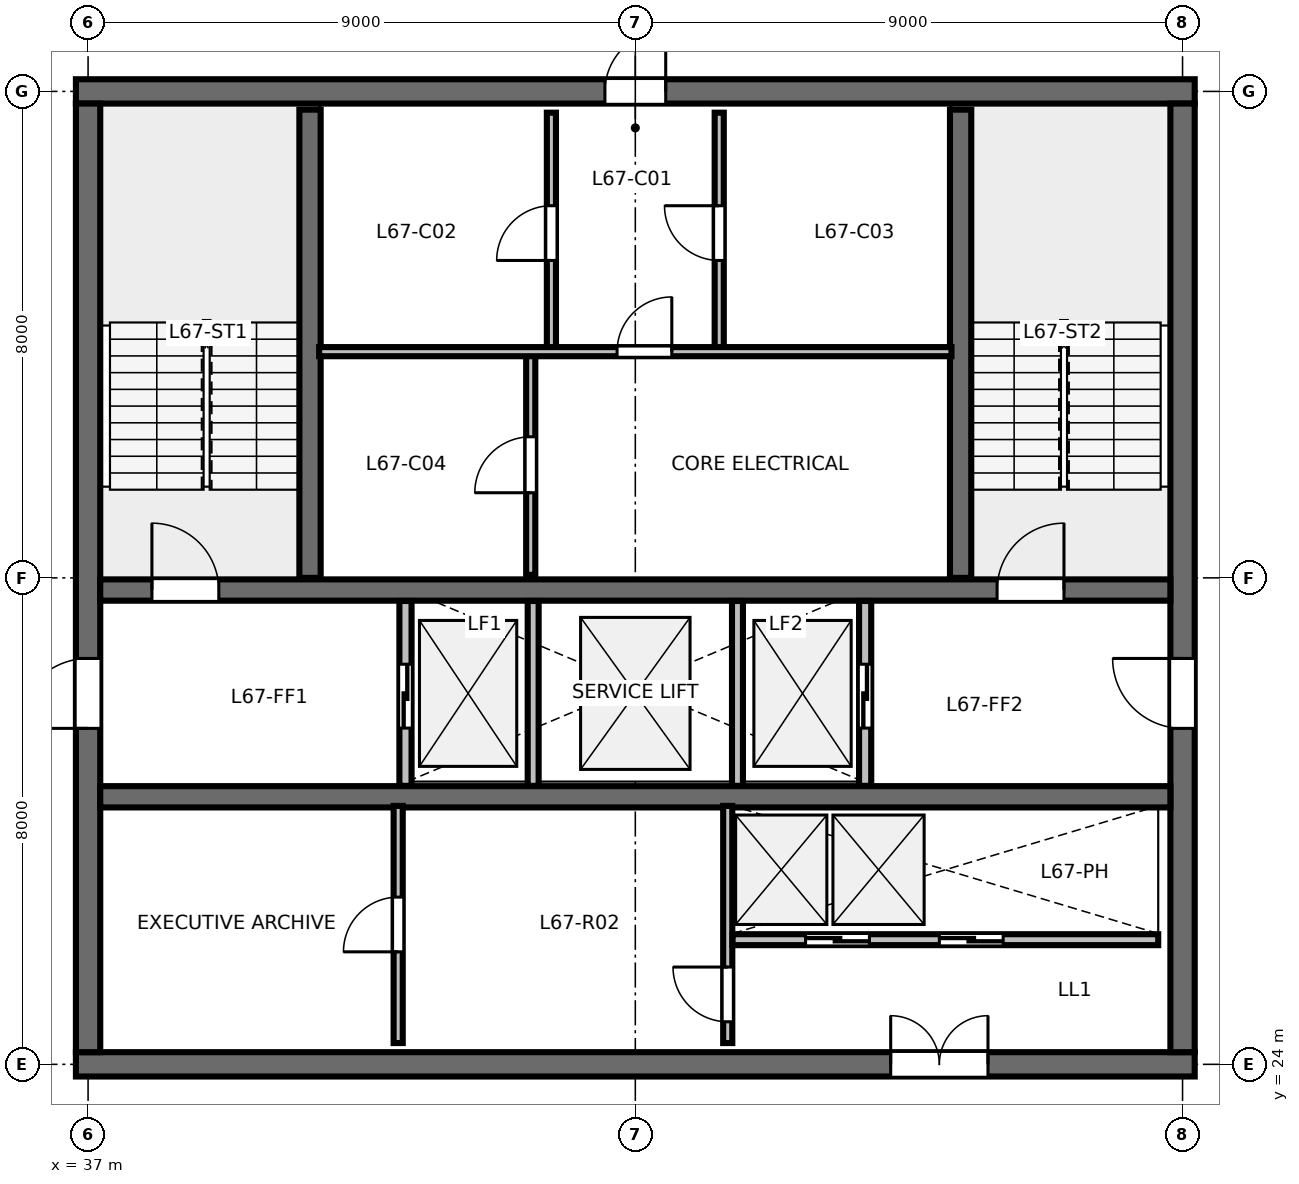
"""IFC4 building model, lengths in metres.
Left out: names, types, materials, properties, quantities, classifications, styles, units other than length and angle.
Written with IfcOpenShell. Run it as: python <this file> out.ifc"""

import sys

from ifc_helpers import new_model, si_unit, direction, frame, frame_2d, origin, place, context, subcontext, project, spatial, rectangle, extrude, element, fill, save


model = new_model("IFC4")
c1 = context("Model", 3, precision=1e-05, world=origin(), true_north=direction((0.0, 1.0)))
c2 = subcontext(c1, "Body", "Model", "MODEL_VIEW")
j1 = project(units=[si_unit("LENGTHUNIT", "METRE"), si_unit("PLANEANGLEUNIT", "RADIAN")], contexts=[c1])
p1 = place(None, origin())
s1 = spatial("IfcSite", under=j1, at=p1, CompositionType="ELEMENT")
p2 = place(p1, origin())
s2 = spatial("IfcBuilding", under=s1, at=p2, CompositionType="ELEMENT")
p3 = place(p2, frame((0.0, 0.0, 253.8)))
s3 = spatial("IfcBuildingStorey", under=s2, at=p3, CompositionType="ELEMENT", Elevation=253.8)
p4 = place(p3, frame((36.8, 24.0, 0.0), z_axis=(0.0, 0.0, 1.0), x_axis=(1.0, 0.0, 0.0)))
e1 = element("IfcWall", 1, at=p4, inside=s3, PredefinedType="SHEAR", context=c2, shape_type="SweptSolid", body=[
    extrude(rectangle(XDim=18.4, YDim=0.4, at=frame_2d((9.2, 0.0))), origin(), (0.0, 0.0, 1.0), 3.36),
])
p5 = place(p4, frame((13.4, 0.0, 0.0)))
e2 = element("IfcOpeningElement", 2, at=p5, cuts=e1, PredefinedType="OPENING", context=c2, shape_type="SweptSolid", body=[
    extrude(rectangle(XDim=1.6, YDim=2.15, at=frame_2d((0.8, 1.075))), frame((0.0, 0.21, 0.0), z_axis=(0.0, -1.0, 0.0), x_axis=(1.0, 0.0, 0.0)), (0.0, 0.0, 1.0), 0.42),
])
p6 = place(p3, frame((36.8, 40.0, 0.0), z_axis=(0.0, 0.0, 1.0), x_axis=(1.0, 0.0, 0.0)))
e3 = element("IfcWall", 3, at=p6, inside=s3, PredefinedType="SHEAR", context=c2, shape_type="SweptSolid", body=[
    extrude(rectangle(XDim=18.4, YDim=0.4, at=frame_2d((9.2, 0.0))), origin(), (0.0, 0.0, 1.0), 3.36),
])
p7 = place(p6, frame((8.7, 0.0, 0.0)))
e4 = element("IfcOpeningElement", 4, at=p7, cuts=e3, PredefinedType="OPENING", context=c2, shape_type="SweptSolid", body=[
    extrude(rectangle(XDim=1.0, YDim=2.15, at=frame_2d((0.5, 1.075))), frame((0.0, 0.21, 0.0), z_axis=(0.0, -1.0, 0.0), x_axis=(1.0, 0.0, 0.0)), (0.0, 0.0, 1.0), 0.42),
])
p8 = place(p3, frame((37.0, 24.2, 0.0), z_axis=(0.0, 0.0, 1.0), x_axis=(0.0, 1.0, 0.0)))
e5 = element("IfcWall", 5, at=p8, inside=s3, PredefinedType="SHEAR", context=c2, shape_type="SweptSolid", body=[
    extrude(rectangle(XDim=15.6, YDim=0.4, at=frame_2d((7.8, 0.0))), origin(), (0.0, 0.0, 1.0), 3.36),
])
p9 = place(p8, frame((5.325, 0.0, 0.0)))
e6 = element("IfcOpeningElement", 6, at=p9, cuts=e5, PredefinedType="OPENING", context=c2, shape_type="SweptSolid", body=[
    extrude(rectangle(XDim=1.15, YDim=2.15, at=frame_2d((0.575, 1.075))), frame((0.0, 0.21, 0.0), z_axis=(0.0, -1.0, 0.0), x_axis=(1.0, 0.0, 0.0)), (0.0, 0.0, 1.0), 0.42),
])
p10 = place(p3, frame((55.0, 24.2, 0.0), z_axis=(0.0, 0.0, 1.0), x_axis=(0.0, 1.0, 0.0)))
e7 = element("IfcWall", 7, at=p10, inside=s3, PredefinedType="SHEAR", context=c2, shape_type="SweptSolid", body=[
    extrude(rectangle(XDim=15.6, YDim=0.4, at=frame_2d((7.8, 0.0))), origin(), (0.0, 0.0, 1.0), 3.36),
])
p11 = place(p10, frame((5.325, 0.0, 0.0)))
e8 = element("IfcOpeningElement", 8, at=p11, cuts=e7, PredefinedType="OPENING", context=c2, shape_type="SweptSolid", body=[
    extrude(rectangle(XDim=1.15, YDim=2.15, at=frame_2d((0.575, 1.075))), frame((0.0, 0.21, 0.0), z_axis=(0.0, -1.0, 0.0), x_axis=(1.0, 0.0, 0.0)), (0.0, 0.0, 1.0), 0.42),
])
p12 = place(p3, frame((37.2, 31.8, 0.0), z_axis=(0.0, 0.0, 1.0), x_axis=(1.0, 0.0, 0.0)))
e9 = element("IfcWall", 9, at=p12, inside=s3, PredefinedType="SHEAR", context=c2, shape_type="SweptSolid", body=[
    extrude(rectangle(XDim=17.6, YDim=0.35, at=frame_2d((8.8, 0.0))), origin(), (0.0, 0.0, 1.0), 3.36),
])
p13 = place(p12, frame((0.85, 0.0, 0.0)))
e10 = element("IfcOpeningElement", 10, at=p13, cuts=e9, PredefinedType="OPENING", context=c2, shape_type="SweptSolid", body=[
    extrude(rectangle(XDim=1.1, YDim=2.15, at=frame_2d((0.55, 1.075))), frame((0.0, 0.185, 0.0), z_axis=(0.0, -1.0, 0.0), x_axis=(1.0, 0.0, 0.0)), (0.0, 0.0, 1.0), 0.37),
])
p14 = place(p12, frame((14.75, 0.0, 0.0)))
e11 = element("IfcOpeningElement", 11, at=p14, cuts=e9, PredefinedType="OPENING", context=c2, shape_type="SweptSolid", body=[
    extrude(rectangle(XDim=1.1, YDim=2.15, at=frame_2d((0.55, 1.075))), frame((0.0, 0.185, 0.0), z_axis=(0.0, -1.0, 0.0), x_axis=(1.0, 0.0, 0.0)), (0.0, 0.0, 1.0), 0.37),
])
p15 = place(p3, frame((37.2, 28.4, 0.0), z_axis=(0.0, 0.0, 1.0), x_axis=(1.0, 0.0, 0.0)))
e12 = element("IfcWall", 12, at=p15, inside=s3, PredefinedType="SHEAR", context=c2, shape_type="SweptSolid", body=[
    extrude(rectangle(XDim=17.6, YDim=0.35, at=frame_2d((8.8, 0.0))), origin(), (0.0, 0.0, 1.0), 3.36),
])
for number, where, z_axis, x_axis in (
    (13, (40.65, 32.0, 0.0), (0.0, 0.0, 1.0), (0.0, 1.0, 0.0)),
    (14, (51.35, 32.0, 0.0), (0.0, 0.0, 1.0), (0.0, 1.0, 0.0)),
):
    element("IfcWall", number, at=place(p3, frame(where, z_axis=z_axis, x_axis=x_axis)), inside=s3, PredefinedType="SHEAR", context=c2, shape_type="SweptSolid", body=[
        extrude(rectangle(XDim=7.7, YDim=0.35, at=frame_2d((3.85, 0.0))), origin(), (0.0, 0.0, 1.0), 3.6),
    ])
p16 = place(p3, frame((44.62, 35.72, 0.0), z_axis=(0.0, 0.0, 1.0), x_axis=(0.0, 1.0, 0.0)))
e15 = element("IfcWall", 15, at=p16, inside=s3, PredefinedType="PARTITIONING", context=c2, shape_type="SweptSolid", body=[
    extrude(rectangle(XDim=3.93, YDim=0.15, at=frame_2d((1.965, 0.0))), origin(), (0.0, 0.0, 1.0), 3.375),
])
p17 = place(p16, frame((1.5, 0.0, 0.0)))
e16 = element("IfcOpeningElement", 16, at=p17, cuts=e15, PredefinedType="OPENING", context=c2, shape_type="SweptSolid", body=[
    extrude(rectangle(XDim=0.9, YDim=2.15, at=frame_2d((0.45, 1.075))), frame((0.0, 0.085, 0.0), z_axis=(0.0, -1.0, 0.0), x_axis=(1.0, 0.0, 0.0)), (0.0, 0.0, 1.0), 0.17),
])
p18 = place(p3, frame((47.38, 35.72, 0.0), z_axis=(0.0, 0.0, 1.0), x_axis=(0.0, 1.0, 0.0)))
e17 = element("IfcWall", 17, at=p18, inside=s3, PredefinedType="PARTITIONING", context=c2, shape_type="SweptSolid", body=[
    extrude(rectangle(XDim=3.93, YDim=0.15, at=frame_2d((1.965, 0.0))), origin(), (0.0, 0.0, 1.0), 3.375),
])
p19 = place(p18, frame((1.5, 0.0, 0.0)))
e18 = element("IfcOpeningElement", 18, at=p19, cuts=e17, PredefinedType="OPENING", context=c2, shape_type="SweptSolid", body=[
    extrude(rectangle(XDim=0.9, YDim=2.15, at=frame_2d((0.45, 1.075))), frame((0.0, 0.085, 0.0), z_axis=(0.0, -1.0, 0.0), x_axis=(1.0, 0.0, 0.0)), (0.0, 0.0, 1.0), 0.17),
])
p20 = place(p3, frame((44.28, 32.05, 0.0), z_axis=(0.0, 0.0, 1.0), x_axis=(0.0, 1.0, 0.0)))
e19 = element("IfcWall", 19, at=p20, inside=s3, PredefinedType="PARTITIONING", context=c2, shape_type="SweptSolid", body=[
    extrude(rectangle(XDim=3.67, YDim=0.15, at=frame_2d((1.835, 0.0))), origin(), (0.0, 0.0, 1.0), 3.375),
])
p21 = place(p20, frame((1.35, 0.0, 0.0)))
e20 = element("IfcOpeningElement", 20, at=p21, cuts=e19, PredefinedType="OPENING", context=c2, shape_type="SweptSolid", body=[
    extrude(rectangle(XDim=0.92, YDim=2.15, at=frame_2d((0.46, 1.075))), frame((0.0, 0.085, 0.0), z_axis=(0.0, -1.0, 0.0), x_axis=(1.0, 0.0, 0.0)), (0.0, 0.0, 1.0), 0.17),
])
p22 = place(p3, frame((40.8, 35.72, 0.0), z_axis=(0.0, 0.0, 1.0), x_axis=(1.0, 0.0, 0.0)))
e21 = element("IfcWall", 21, at=p22, inside=s3, PredefinedType="PARTITIONING", context=c2, shape_type="SweptSolid", body=[
    extrude(rectangle(XDim=10.4, YDim=0.15, at=frame_2d((5.2, 0.0))), origin(), (0.0, 0.0, 1.0), 3.375),
])
p23 = place(p22, frame((4.9, 0.0, 0.0)))
e22 = element("IfcOpeningElement", 22, at=p23, cuts=e21, PredefinedType="OPENING", context=c2, shape_type="SweptSolid", body=[
    extrude(rectangle(XDim=0.9, YDim=2.15, at=frame_2d((0.45, 1.075))), frame((0.0, 0.085, 0.0), z_axis=(0.0, -1.0, 0.0), x_axis=(1.0, 0.0, 0.0)), (0.0, 0.0, 1.0), 0.17),
])
p24 = place(p3, frame((42.22, 28.58, 0.0), z_axis=(0.0, 0.0, 1.0), x_axis=(0.0, 1.0, 0.0)))
e23 = element("IfcWall", 23, at=p24, inside=s3, PredefinedType="PARTITIONING", context=c2, shape_type="SweptSolid", body=[
    extrude(rectangle(XDim=3.04, YDim=0.2, at=frame_2d((1.52, 0.0))), origin(), (0.0, 0.0, 1.0), 3.375),
])
p25 = place(p24, frame((0.95, 0.0, 0.0)))
e24 = element("IfcOpeningElement", 24, at=p25, cuts=e23, PredefinedType="OPENING", context=c2, shape_type="SweptSolid", body=[
    extrude(rectangle(XDim=1.05, YDim=2.15, at=frame_2d((0.525, 1.075))), frame((0.0, 0.11, 0.0), z_axis=(0.0, -1.0, 0.0), x_axis=(1.0, 0.0, 0.0)), (0.0, 0.0, 1.0), 0.22),
])
p26 = place(p3, frame((49.78, 28.58, 0.0), z_axis=(0.0, 0.0, 1.0), x_axis=(0.0, 1.0, 0.0)))
e25 = element("IfcWall", 25, at=p26, inside=s3, PredefinedType="PARTITIONING", context=c2, shape_type="SweptSolid", body=[
    extrude(rectangle(XDim=3.04, YDim=0.2, at=frame_2d((1.52, 0.0))), origin(), (0.0, 0.0, 1.0), 3.375),
])
p27 = place(p26, frame((0.95, 0.0, 0.0)))
e26 = element("IfcOpeningElement", 26, at=p27, cuts=e25, PredefinedType="OPENING", context=c2, shape_type="SweptSolid", body=[
    extrude(rectangle(XDim=1.05, YDim=2.15, at=frame_2d((0.525, 1.075))), frame((0.0, 0.11, 0.0), z_axis=(0.0, -1.0, 0.0), x_axis=(1.0, 0.0, 0.0)), (0.0, 0.0, 1.0), 0.22),
])
for number, where, z_axis, x_axis in (
    (27, (44.32, 28.58, 0.0), (0.0, 0.0, 1.0), (0.0, 1.0, 0.0)),
    (28, (47.68, 28.58, 0.0), (0.0, 0.0, 1.0), (0.0, 1.0, 0.0)),
):
    element("IfcWall", number, at=place(p3, frame(where, z_axis=z_axis, x_axis=x_axis)), inside=s3, PredefinedType="PARTITIONING", context=c2, shape_type="SweptSolid", body=[
        extrude(rectangle(XDim=3.04, YDim=0.18, at=frame_2d((1.52, 0.0))), origin(), (0.0, 0.0, 1.0), 3.375),
    ])
p28 = place(p3, frame((42.1, 24.35, 0.0), z_axis=(0.0, 0.0, 1.0), x_axis=(0.0, 1.0, 0.0)))
e29 = element("IfcWall", 29, at=p28, inside=s3, PredefinedType="PARTITIONING", context=c2, shape_type="SweptSolid", body=[
    extrude(rectangle(XDim=3.9, YDim=0.15, at=frame_2d((1.95, 0.0))), origin(), (0.0, 0.0, 1.0), 3.375),
])
p29 = place(p28, frame((1.5, 0.0, 0.0)))
e30 = element("IfcOpeningElement", 30, at=p29, cuts=e29, PredefinedType="OPENING", context=c2, shape_type="SweptSolid", body=[
    extrude(rectangle(XDim=0.9, YDim=2.15, at=frame_2d((0.45, 1.075))), frame((0.0, 0.085, 0.0), z_axis=(0.0, -1.0, 0.0), x_axis=(1.0, 0.0, 0.0)), (0.0, 0.0, 1.0), 0.17),
])
p30 = place(p3, frame((47.52, 24.35, 0.0), z_axis=(0.0, 0.0, 1.0), x_axis=(0.0, 1.0, 0.0)))
e31 = element("IfcWall", 31, at=p30, inside=s3, PredefinedType="PARTITIONING", context=c2, shape_type="SweptSolid", body=[
    extrude(rectangle(XDim=3.9, YDim=0.15, at=frame_2d((1.95, 0.0))), origin(), (0.0, 0.0, 1.0), 3.375),
])
p31 = place(p30, frame((0.35, 0.0, 0.0)))
e32 = element("IfcOpeningElement", 32, at=p31, cuts=e31, PredefinedType="OPENING", context=c2, shape_type="SweptSolid", body=[
    extrude(rectangle(XDim=0.9, YDim=2.15, at=frame_2d((0.45, 1.075))), frame((0.0, 0.085, 0.0), z_axis=(0.0, -1.0, 0.0), x_axis=(1.0, 0.0, 0.0)), (0.0, 0.0, 1.0), 0.17),
])
p32 = place(p3, frame((47.6, 26.05, 0.0), z_axis=(0.0, 0.0, 1.0), x_axis=(1.0, 0.0, 0.0)))
e33 = element("IfcWall", 33, at=p32, inside=s3, PredefinedType="PARTITIONING", context=c2, shape_type="SweptSolid", body=[
    extrude(rectangle(XDim=7.0, YDim=0.18, at=frame_2d((3.5, 0.0))), origin(), (0.0, 0.0, 1.0), 3.375),
])
p33 = place(p32, frame((1.2, 0.0, 0.0)))
e34 = element("IfcOpeningElement", 34, at=p33, cuts=e33, PredefinedType="OPENING", context=c2, shape_type="SweptSolid", body=[
    extrude(rectangle(XDim=1.05, YDim=2.15, at=frame_2d((0.525, 1.075))), frame((0.0, 0.1, 0.0), z_axis=(0.0, -1.0, 0.0), x_axis=(1.0, 0.0, 0.0)), (0.0, 0.0, 1.0), 0.2),
])
p34 = place(p32, frame((3.4, 0.0, 0.0)))
e35 = element("IfcOpeningElement", 35, at=p34, cuts=e33, PredefinedType="OPENING", context=c2, shape_type="SweptSolid", body=[
    extrude(rectangle(XDim=1.05, YDim=2.15, at=frame_2d((0.525, 1.075))), frame((0.0, 0.1, 0.0), z_axis=(0.0, -1.0, 0.0), x_axis=(1.0, 0.0, 0.0)), (0.0, 0.0, 1.0), 0.2),
])
p35 = place(p13, origin())
e36 = element("IfcDoor", 36, at=p35, inside=s3, OperationType="SINGLE_SWING_LEFT", PredefinedType="DOOR", context=c2, shape_type="SweptSolid", body=[
    extrude(rectangle(XDim=1.1, YDim=2.15, at=frame_2d((0.55, 1.075))), frame((0.0, 0.025, 0.0), z_axis=(0.0, -1.0, 0.0), x_axis=(1.0, 0.0, 0.0)), (0.0, 0.0, 1.0), 0.05),
])
fill(e10, e36)
p36 = place(p14, origin())
e37 = element("IfcDoor", 37, at=p36, inside=s3, OperationType="SINGLE_SWING_RIGHT", PredefinedType="DOOR", context=c2, shape_type="SweptSolid", body=[
    extrude(rectangle(XDim=1.1, YDim=2.15, at=frame_2d((0.55, 1.075))), frame((0.0, 0.025, 0.0), z_axis=(0.0, -1.0, 0.0), x_axis=(1.0, 0.0, 0.0)), (0.0, 0.0, 1.0), 0.05),
])
fill(e11, e37)
p37 = place(p7, origin())
e38 = element("IfcDoor", 38, at=p37, inside=s3, OperationType="SINGLE_SWING_RIGHT", PredefinedType="DOOR", context=c2, shape_type="SweptSolid", body=[
    extrude(rectangle(XDim=1.0, YDim=2.15, at=frame_2d((0.5, 1.075))), frame((0.0, 0.025, 0.0), z_axis=(0.0, -1.0, 0.0), x_axis=(1.0, 0.0, 0.0)), (0.0, 0.0, 1.0), 0.05),
])
fill(e4, e38)
p38 = place(p9, origin())
e39 = element("IfcDoor", 39, at=p38, inside=s3, OperationType="SINGLE_SWING_LEFT", PredefinedType="DOOR", context=c2, shape_type="SweptSolid", body=[
    extrude(rectangle(XDim=1.15, YDim=2.15, at=frame_2d((0.575, 1.075))), frame((0.0, 0.025, 0.0), z_axis=(0.0, -1.0, 0.0), x_axis=(1.0, 0.0, 0.0)), (0.0, 0.0, 1.0), 0.05),
])
fill(e6, e39)
p39 = place(p11, origin())
e40 = element("IfcDoor", 40, at=p39, inside=s3, OperationType="SINGLE_SWING_RIGHT", PredefinedType="DOOR", context=c2, shape_type="SweptSolid", body=[
    extrude(rectangle(XDim=1.15, YDim=2.15, at=frame_2d((0.575, 1.075))), frame((0.0, 0.025, 0.0), z_axis=(0.0, -1.0, 0.0), x_axis=(1.0, 0.0, 0.0)), (0.0, 0.0, 1.0), 0.05),
])
fill(e8, e40)
p40 = place(p5, origin())
e41 = element("IfcDoor", 41, at=p40, inside=s3, OperationType="DOUBLE_DOOR_SINGLE_SWING", PredefinedType="DOOR", context=c2, shape_type="SweptSolid", body=[
    extrude(rectangle(XDim=1.6, YDim=2.15, at=frame_2d((0.8, 1.075))), frame((0.0, 0.025, 0.0), z_axis=(0.0, -1.0, 0.0), x_axis=(1.0, 0.0, 0.0)), (0.0, 0.0, 1.0), 0.05),
])
fill(e2, e41)
p41 = place(p17, origin())
e42 = element("IfcDoor", 42, at=p41, inside=s3, OperationType="SINGLE_SWING_LEFT", PredefinedType="DOOR", context=c2, shape_type="SweptSolid", body=[
    extrude(rectangle(XDim=0.9, YDim=2.15, at=frame_2d((0.45, 1.075))), frame((0.0, 0.025, 0.0), z_axis=(0.0, -1.0, 0.0), x_axis=(1.0, 0.0, 0.0)), (0.0, 0.0, 1.0), 0.05),
])
fill(e16, e42)
p42 = place(p19, origin())
e43 = element("IfcDoor", 43, at=p42, inside=s3, OperationType="SINGLE_SWING_RIGHT", PredefinedType="DOOR", context=c2, shape_type="SweptSolid", body=[
    extrude(rectangle(XDim=0.9, YDim=2.15, at=frame_2d((0.45, 1.075))), frame((0.0, 0.025, 0.0), z_axis=(0.0, -1.0, 0.0), x_axis=(1.0, 0.0, 0.0)), (0.0, 0.0, 1.0), 0.05),
])
fill(e18, e43)
p43 = place(p21, origin())
e44 = element("IfcDoor", 44, at=p43, inside=s3, OperationType="SINGLE_SWING_LEFT", PredefinedType="DOOR", context=c2, shape_type="SweptSolid", body=[
    extrude(rectangle(XDim=0.92, YDim=2.15, at=frame_2d((0.46, 1.075))), frame((0.0, 0.025, 0.0), z_axis=(0.0, -1.0, 0.0), x_axis=(1.0, 0.0, 0.0)), (0.0, 0.0, 1.0), 0.05),
])
fill(e20, e44)
p44 = place(p23, origin())
e45 = element("IfcDoor", 45, at=p44, inside=s3, OperationType="SINGLE_SWING_RIGHT", PredefinedType="DOOR", context=c2, shape_type="SweptSolid", body=[
    extrude(rectangle(XDim=0.9, YDim=2.15, at=frame_2d((0.45, 1.075))), frame((0.0, 0.025, 0.0), z_axis=(0.0, -1.0, 0.0), x_axis=(1.0, 0.0, 0.0)), (0.0, 0.0, 1.0), 0.05),
])
fill(e22, e45)
p45 = place(p25, origin())
e46 = element("IfcDoor", 46, at=p45, inside=s3, OperationType="SLIDING_TO_LEFT", PredefinedType="DOOR", context=c2, shape_type="SweptSolid", body=[
    extrude(rectangle(XDim=1.05, YDim=2.15, at=frame_2d((0.525, 1.075))), frame((0.0, 0.025, 0.0), z_axis=(0.0, -1.0, 0.0), x_axis=(1.0, 0.0, 0.0)), (0.0, 0.0, 1.0), 0.05),
])
fill(e24, e46)
p46 = place(p27, origin())
e47 = element("IfcDoor", 47, at=p46, inside=s3, OperationType="SLIDING_TO_RIGHT", PredefinedType="DOOR", context=c2, shape_type="SweptSolid", body=[
    extrude(rectangle(XDim=1.05, YDim=2.15, at=frame_2d((0.525, 1.075))), frame((0.0, 0.025, 0.0), z_axis=(0.0, -1.0, 0.0), x_axis=(1.0, 0.0, 0.0)), (0.0, 0.0, 1.0), 0.05),
])
fill(e26, e47)
p47 = place(p29, origin())
e48 = element("IfcDoor", 48, at=p47, inside=s3, OperationType="SINGLE_SWING_LEFT", PredefinedType="DOOR", context=c2, shape_type="SweptSolid", body=[
    extrude(rectangle(XDim=0.9, YDim=2.15, at=frame_2d((0.45, 1.075))), frame((0.0, 0.025, 0.0), z_axis=(0.0, -1.0, 0.0), x_axis=(1.0, 0.0, 0.0)), (0.0, 0.0, 1.0), 0.05),
])
fill(e30, e48)
p48 = place(p31, origin())
e49 = element("IfcDoor", 49, at=p48, inside=s3, OperationType="SINGLE_SWING_RIGHT", PredefinedType="DOOR", context=c2, shape_type="SweptSolid", body=[
    extrude(rectangle(XDim=0.9, YDim=2.15, at=frame_2d((0.45, 1.075))), frame((0.0, 0.025, 0.0), z_axis=(0.0, -1.0, 0.0), x_axis=(1.0, 0.0, 0.0)), (0.0, 0.0, 1.0), 0.05),
])
fill(e32, e49)
p49 = place(p33, origin())
e50 = element("IfcDoor", 50, at=p49, inside=s3, OperationType="SLIDING_TO_LEFT", PredefinedType="DOOR", context=c2, shape_type="SweptSolid", body=[
    extrude(rectangle(XDim=1.05, YDim=2.15, at=frame_2d((0.525, 1.075))), frame((0.0, 0.025, 0.0), z_axis=(0.0, -1.0, 0.0), x_axis=(1.0, 0.0, 0.0)), (0.0, 0.0, 1.0), 0.05),
])
fill(e34, e50)
p50 = place(p34, origin())
e51 = element("IfcDoor", 51, at=p50, inside=s3, OperationType="SLIDING_TO_RIGHT", PredefinedType="DOOR", context=c2, shape_type="SweptSolid", body=[
    extrude(rectangle(XDim=1.05, YDim=2.15, at=frame_2d((0.525, 1.075))), frame((0.0, 0.025, 0.0), z_axis=(0.0, -1.0, 0.0), x_axis=(1.0, 0.0, 0.0)), (0.0, 0.0, 1.0), 0.05),
])
fill(e35, e51)
save(model, sys.argv[1])
